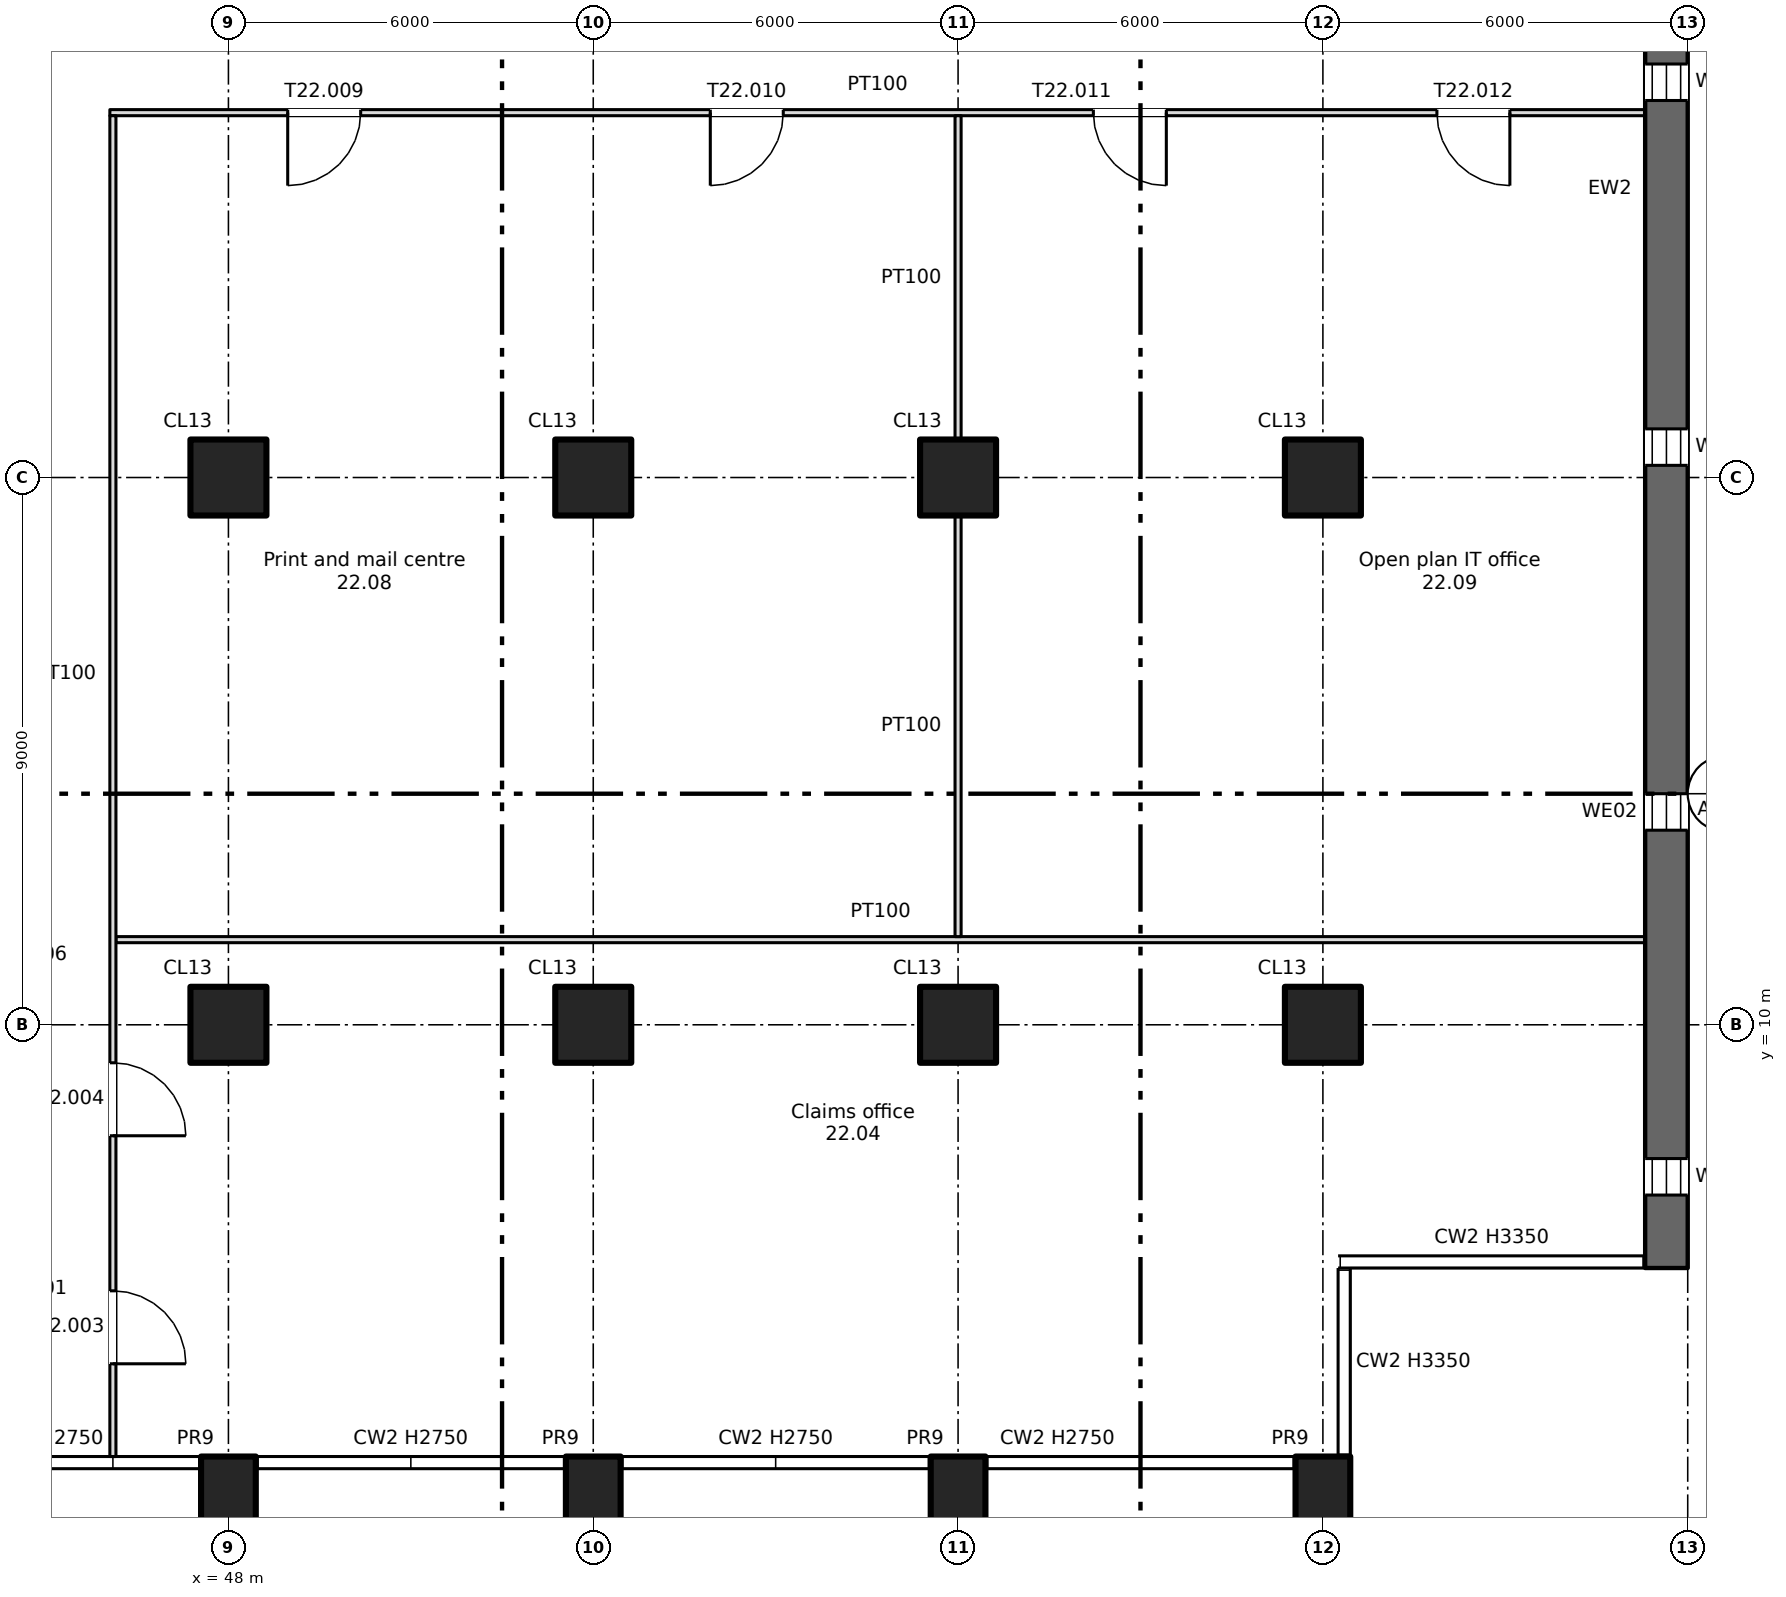
"""IFC4 building model, lengths in metres.
Left out: names, types, materials, properties, quantities, classifications, styles, units other than length and angle.
Written with IfcOpenShell. Run it as: python <this file> out.ifc"""

import sys

from ifc_helpers import new_model, si_unit, direction, frame, frame_2d, origin, origin_2d, place, context, subcontext, project, spatial, rectangle, extrude, element, fill, save


model = new_model("IFC4")
c1 = context("Model", 3, precision=1e-05, world=origin(), true_north=direction((0.0, 1.0)))
c2 = subcontext(c1, "Body", "Model", "MODEL_VIEW")
j1 = project(units=[si_unit("LENGTHUNIT", "METRE"), si_unit("PLANEANGLEUNIT", "RADIAN")], contexts=[c1])
p1 = place(None, origin())
s1 = spatial("IfcSite", under=j1, at=p1, CompositionType="ELEMENT")
p2 = place(p1, origin())
s2 = spatial("IfcBuilding", under=s1, at=p2, CompositionType="ELEMENT")
p3 = place(p2, frame((0.0, 0.0, 143.75)))
s3 = spatial("IfcBuildingStorey", under=s2, at=p3, CompositionType="ELEMENT", Elevation=143.75)
for number, where, z_axis, x_axis in (
    (1, (48.0, 2.2, -0.4), (0.0, 0.0, 1.0), (1.0, 0.0, 0.0)),
    (2, (54.0, 2.2, -0.4), (0.0, 0.0, 1.0), (1.0, 0.0, 0.0)),
    (3, (60.0, 2.2, -0.4), (0.0, 0.0, 1.0), (1.0, 0.0, 0.0)),
    (4, (66.0, 2.2, -0.4), (0.0, 0.0, 1.0), (1.0, 0.0, 0.0)),
):
    element("IfcColumn", number, at=place(p3, frame(where, z_axis=z_axis, x_axis=x_axis)), inside=s3, PredefinedType="COLUMN", context=c2, shape_type="SweptSolid", body=[
        extrude(rectangle(XDim=0.9, YDim=1.4, at=origin_2d()), origin(), (0.0, 0.0, 1.0), 3.75),
    ])
for number, where, z_axis, x_axis in (
    (5, (48.0, 10.0, 0.0), (0.0, 0.0, 1.0), (1.0, 0.0, 0.0)),
    (6, (48.0, 19.0, 0.0), (0.0, 0.0, 1.0), (1.0, 0.0, 0.0)),
    (7, (54.0, 10.0, 0.0), (0.0, 0.0, 1.0), (1.0, 0.0, 0.0)),
    (8, (54.0, 19.0, 0.0), (0.0, 0.0, 1.0), (1.0, 0.0, 0.0)),
    (9, (60.0, 10.0, 0.0), (0.0, 0.0, 1.0), (1.0, 0.0, 0.0)),
    (10, (60.0, 19.0, 0.0), (0.0, 0.0, 1.0), (1.0, 0.0, 0.0)),
    (11, (66.0, 10.0, 0.0), (0.0, 0.0, 1.0), (1.0, 0.0, 0.0)),
    (12, (66.0, 19.0, 0.0), (0.0, 0.0, 1.0), (1.0, 0.0, 0.0)),
):
    element("IfcColumn", number, at=place(p3, frame(where, z_axis=z_axis, x_axis=x_axis)), inside=s3, PredefinedType="COLUMN", context=c2, shape_type="SweptSolid", body=[
        extrude(rectangle(XDim=1.25, YDim=1.25, at=origin_2d()), origin(), (0.0, 0.0, 1.0), 3.35),
    ])
p4 = place(p3, frame((71.65, 6.0, 0.0), z_axis=(0.0, 0.0, 1.0), x_axis=(0.0, 1.0, 0.0)))
e13 = element("IfcWall", 13, at=p4, inside=s3, PredefinedType="SHEAR", context=c2, shape_type="SweptSolid", body=[
    extrude(rectangle(XDim=35.5, YDim=0.7, at=frame_2d((17.75, 0.0))), origin(), (0.0, 0.0, 1.0), 3.35),
])
p5 = place(p4, frame((1.2, 0.0, 0.6)))
e14 = element("IfcOpeningElement", 14, at=p5, cuts=e13, PredefinedType="OPENING", context=c2, shape_type="SweptSolid", body=[
    extrude(rectangle(XDim=0.6, YDim=2.4, at=frame_2d((0.3, 1.2))), frame((0.0, 0.36, 0.0), z_axis=(0.0, -1.0, 0.0), x_axis=(1.0, 0.0, 0.0)), (0.0, 0.0, 1.0), 0.72),
])
p6 = place(p4, frame((7.2, 0.0, 0.6)))
e15 = element("IfcOpeningElement", 15, at=p6, cuts=e13, PredefinedType="OPENING", context=c2, shape_type="SweptSolid", body=[
    extrude(rectangle(XDim=0.6, YDim=2.4, at=frame_2d((0.3, 1.2))), frame((0.0, 0.36, 0.0), z_axis=(0.0, -1.0, 0.0), x_axis=(1.0, 0.0, 0.0)), (0.0, 0.0, 1.0), 0.72),
])
p7 = place(p4, frame((13.2, 0.0, 0.6)))
e16 = element("IfcOpeningElement", 16, at=p7, cuts=e13, PredefinedType="OPENING", context=c2, shape_type="SweptSolid", body=[
    extrude(rectangle(XDim=0.6, YDim=2.4, at=frame_2d((0.3, 1.2))), frame((0.0, 0.36, 0.0), z_axis=(0.0, -1.0, 0.0), x_axis=(1.0, 0.0, 0.0)), (0.0, 0.0, 1.0), 0.72),
])
p8 = place(p4, frame((19.2, 0.0, 0.6)))
e17 = element("IfcOpeningElement", 17, at=p8, cuts=e13, PredefinedType="OPENING", context=c2, shape_type="SweptSolid", body=[
    extrude(rectangle(XDim=0.6, YDim=2.4, at=frame_2d((0.3, 1.2))), frame((0.0, 0.36, 0.0), z_axis=(0.0, -1.0, 0.0), x_axis=(1.0, 0.0, 0.0)), (0.0, 0.0, 1.0), 0.72),
])
p9 = place(p4, frame((25.2, 0.0, 0.6)))
e18 = element("IfcOpeningElement", 18, at=p9, cuts=e13, PredefinedType="OPENING", context=c2, shape_type="SweptSolid", body=[
    extrude(rectangle(XDim=0.6, YDim=2.4, at=frame_2d((0.3, 1.2))), frame((0.0, 0.36, 0.0), z_axis=(0.0, -1.0, 0.0), x_axis=(1.0, 0.0, 0.0)), (0.0, 0.0, 1.0), 0.72),
])
p10 = place(p4, frame((31.2, 0.0, 0.6)))
e19 = element("IfcOpeningElement", 19, at=p10, cuts=e13, PredefinedType="OPENING", context=c2, shape_type="SweptSolid", body=[
    extrude(rectangle(XDim=0.6, YDim=2.4, at=frame_2d((0.3, 1.2))), frame((0.0, 0.36, 0.0), z_axis=(0.0, -1.0, 0.0), x_axis=(1.0, 0.0, 0.0)), (0.0, 0.0, 1.0), 0.72),
])
p11 = place(p3, frame((46.15, 11.4, 0.0), z_axis=(0.0, 0.0, 1.0), x_axis=(1.0, 0.0, 0.0)))
e20 = element("IfcWall", 20, at=p11, inside=s3, PredefinedType="PARTITIONING", context=c2, shape_type="SweptSolid", body=[
    extrude(rectangle(XDim=25.15, YDim=0.1, at=frame_2d((12.575, 0.0))), origin(), (0.0, 0.0, 1.0), 3.35),
])
p12 = place(p3, frame((46.05, 25.0, 0.0), z_axis=(0.0, 0.0, 1.0), x_axis=(1.0, 0.0, 0.0)))
e21 = element("IfcWall", 21, at=p12, inside=s3, PredefinedType="PARTITIONING", context=c2, shape_type="SweptSolid", body=[
    extrude(rectangle(XDim=25.25, YDim=0.1, at=frame_2d((12.625, 0.0))), origin(), (0.0, 0.0, 1.0), 3.35),
])
p13 = place(p12, frame((2.925, 0.0, 0.0)))
e22 = element("IfcOpeningElement", 22, at=p13, cuts=e21, PredefinedType="OPENING", context=c2, shape_type="SweptSolid", body=[
    extrude(rectangle(XDim=1.2, YDim=2.1, at=frame_2d((0.6, 1.05))), frame((0.0, 0.06, 0.0), z_axis=(0.0, -1.0, 0.0), x_axis=(1.0, 0.0, 0.0)), (0.0, 0.0, 1.0), 0.12),
])
p14 = place(p12, frame((9.875, 0.0, 0.0)))
e23 = element("IfcOpeningElement", 23, at=p14, cuts=e21, PredefinedType="OPENING", context=c2, shape_type="SweptSolid", body=[
    extrude(rectangle(XDim=1.2, YDim=2.1, at=frame_2d((0.6, 1.05))), frame((0.0, 0.06, 0.0), z_axis=(0.0, -1.0, 0.0), x_axis=(1.0, 0.0, 0.0)), (0.0, 0.0, 1.0), 0.12),
])
p15 = place(p12, frame((16.175, 0.0, 0.0)))
e24 = element("IfcOpeningElement", 24, at=p15, cuts=e21, PredefinedType="OPENING", context=c2, shape_type="SweptSolid", body=[
    extrude(rectangle(XDim=1.2, YDim=2.1, at=frame_2d((0.6, 1.05))), frame((0.0, 0.06, 0.0), z_axis=(0.0, -1.0, 0.0), x_axis=(1.0, 0.0, 0.0)), (0.0, 0.0, 1.0), 0.12),
])
p16 = place(p12, frame((21.825, 0.0, 0.0)))
e25 = element("IfcOpeningElement", 25, at=p16, cuts=e21, PredefinedType="OPENING", context=c2, shape_type="SweptSolid", body=[
    extrude(rectangle(XDim=1.2, YDim=2.1, at=frame_2d((0.6, 1.05))), frame((0.0, 0.06, 0.0), z_axis=(0.0, -1.0, 0.0), x_axis=(1.0, 0.0, 0.0)), (0.0, 0.0, 1.0), 0.12),
])
p17 = place(p3, frame((46.1, 2.9, 0.0), z_axis=(0.0, 0.0, 1.0), x_axis=(0.0, 1.0, 0.0)))
e26 = element("IfcWall", 26, at=p17, inside=s3, PredefinedType="PARTITIONING", context=c2, shape_type="SweptSolid", body=[
    extrude(rectangle(XDim=22.05, YDim=0.1, at=frame_2d((11.025, 0.0))), origin(), (0.0, 0.0, 1.0), 3.35),
])
p18 = place(p17, frame((1.525, 0.0, 0.0)))
e27 = element("IfcOpeningElement", 27, at=p18, cuts=e26, PredefinedType="OPENING", context=c2, shape_type="SweptSolid", body=[
    extrude(rectangle(XDim=1.2, YDim=2.1, at=frame_2d((0.6, 1.05))), frame((0.0, 0.06, 0.0), z_axis=(0.0, -1.0, 0.0), x_axis=(1.0, 0.0, 0.0)), (0.0, 0.0, 1.0), 0.12),
])
p19 = place(p17, frame((5.275, 0.0, 0.0)))
e28 = element("IfcOpeningElement", 28, at=p19, cuts=e26, PredefinedType="OPENING", context=c2, shape_type="SweptSolid", body=[
    extrude(rectangle(XDim=1.2, YDim=2.1, at=frame_2d((0.6, 1.05))), frame((0.0, 0.06, 0.0), z_axis=(0.0, -1.0, 0.0), x_axis=(1.0, 0.0, 0.0)), (0.0, 0.0, 1.0), 0.12),
])
p20 = place(p3, frame((60.0, 11.45, 0.0), z_axis=(0.0, 0.0, 1.0), x_axis=(0.0, 1.0, 0.0)))
e29 = element("IfcWall", 29, at=p20, inside=s3, PredefinedType="PARTITIONING", context=c2, shape_type="SweptSolid", body=[
    extrude(rectangle(XDim=6.925, YDim=0.1, at=frame_2d((3.462, 0.0))), origin(), (0.0, 0.0, 1.0), 3.35),
])
p21 = place(p3, frame((60.0, 19.625, 0.0), z_axis=(0.0, 0.0, 1.0), x_axis=(0.0, 1.0, 0.0)))
e30 = element("IfcWall", 30, at=p21, inside=s3, PredefinedType="PARTITIONING", context=c2, shape_type="SweptSolid", body=[
    extrude(rectangle(XDim=5.325, YDim=0.1, at=frame_2d((2.663, 0.0))), origin(), (0.0, 0.0, 1.0), 3.35),
])
p22 = place(p5, origin())
e31 = element("IfcWindow", 31, at=p22, inside=s3, PartitioningType="SINGLE_PANEL", PredefinedType="WINDOW", context=c2, shape_type="SweptSolid", body=[
    extrude(rectangle(XDim=0.6, YDim=2.4, at=frame_2d((0.3, 1.2))), frame((0.0, 0.03, 0.0), z_axis=(0.0, -1.0, 0.0), x_axis=(1.0, 0.0, 0.0)), (0.0, 0.0, 1.0), 0.06),
])
fill(e14, e31)
p23 = place(p6, origin())
e32 = element("IfcWindow", 32, at=p23, inside=s3, PartitioningType="SINGLE_PANEL", PredefinedType="WINDOW", context=c2, shape_type="SweptSolid", body=[
    extrude(rectangle(XDim=0.6, YDim=2.4, at=frame_2d((0.3, 1.2))), frame((0.0, 0.03, 0.0), z_axis=(0.0, -1.0, 0.0), x_axis=(1.0, 0.0, 0.0)), (0.0, 0.0, 1.0), 0.06),
])
fill(e15, e32)
p24 = place(p7, origin())
e33 = element("IfcWindow", 33, at=p24, inside=s3, PartitioningType="SINGLE_PANEL", PredefinedType="WINDOW", context=c2, shape_type="SweptSolid", body=[
    extrude(rectangle(XDim=0.6, YDim=2.4, at=frame_2d((0.3, 1.2))), frame((0.0, 0.03, 0.0), z_axis=(0.0, -1.0, 0.0), x_axis=(1.0, 0.0, 0.0)), (0.0, 0.0, 1.0), 0.06),
])
fill(e16, e33)
p25 = place(p8, origin())
e34 = element("IfcWindow", 34, at=p25, inside=s3, PartitioningType="SINGLE_PANEL", PredefinedType="WINDOW", context=c2, shape_type="SweptSolid", body=[
    extrude(rectangle(XDim=0.6, YDim=2.4, at=frame_2d((0.3, 1.2))), frame((0.0, 0.03, 0.0), z_axis=(0.0, -1.0, 0.0), x_axis=(1.0, 0.0, 0.0)), (0.0, 0.0, 1.0), 0.06),
])
fill(e17, e34)
p26 = place(p18, origin())
e35 = element("IfcDoor", 35, at=p26, inside=s3, OperationType="SINGLE_SWING_LEFT", PredefinedType="DOOR", context=c2, shape_type="SweptSolid", body=[
    extrude(rectangle(XDim=1.2, YDim=2.1, at=frame_2d((0.6, 1.05))), frame((0.0, 0.025, 0.0), z_axis=(0.0, -1.0, 0.0), x_axis=(1.0, 0.0, 0.0)), (0.0, 0.0, 1.0), 0.05),
])
fill(e27, e35)
p27 = place(p19, origin())
e36 = element("IfcDoor", 36, at=p27, inside=s3, OperationType="SINGLE_SWING_LEFT", PredefinedType="DOOR", context=c2, shape_type="SweptSolid", body=[
    extrude(rectangle(XDim=1.2, YDim=2.1, at=frame_2d((0.6, 1.05))), frame((0.0, 0.025, 0.0), z_axis=(0.0, -1.0, 0.0), x_axis=(1.0, 0.0, 0.0)), (0.0, 0.0, 1.0), 0.05),
])
fill(e28, e36)
p28 = place(p13, origin())
e37 = element("IfcDoor", 37, at=p28, inside=s3, OperationType="SINGLE_SWING_LEFT", PredefinedType="DOOR", context=c2, shape_type="SweptSolid", body=[
    extrude(rectangle(XDim=1.2, YDim=2.1, at=frame_2d((0.6, 1.05))), frame((0.0, 0.025, 0.0), z_axis=(0.0, -1.0, 0.0), x_axis=(1.0, 0.0, 0.0)), (0.0, 0.0, 1.0), 0.05),
])
fill(e22, e37)
p29 = place(p14, origin())
e38 = element("IfcDoor", 38, at=p29, inside=s3, OperationType="SINGLE_SWING_LEFT", PredefinedType="DOOR", context=c2, shape_type="SweptSolid", body=[
    extrude(rectangle(XDim=1.2, YDim=2.1, at=frame_2d((0.6, 1.05))), frame((0.0, 0.025, 0.0), z_axis=(0.0, -1.0, 0.0), x_axis=(1.0, 0.0, 0.0)), (0.0, 0.0, 1.0), 0.05),
])
fill(e23, e38)
p30 = place(p15, origin())
e39 = element("IfcDoor", 39, at=p30, inside=s3, OperationType="SINGLE_SWING_RIGHT", PredefinedType="DOOR", context=c2, shape_type="SweptSolid", body=[
    extrude(rectangle(XDim=1.2, YDim=2.1, at=frame_2d((0.6, 1.05))), frame((0.0, 0.025, 0.0), z_axis=(0.0, -1.0, 0.0), x_axis=(1.0, 0.0, 0.0)), (0.0, 0.0, 1.0), 0.05),
])
fill(e24, e39)
p31 = place(p16, origin())
e40 = element("IfcDoor", 40, at=p31, inside=s3, OperationType="SINGLE_SWING_RIGHT", PredefinedType="DOOR", context=c2, shape_type="SweptSolid", body=[
    extrude(rectangle(XDim=1.2, YDim=2.1, at=frame_2d((0.6, 1.05))), frame((0.0, 0.025, 0.0), z_axis=(0.0, -1.0, 0.0), x_axis=(1.0, 0.0, 0.0)), (0.0, 0.0, 1.0), 0.05),
])
fill(e25, e40)
save(model, sys.argv[1])
